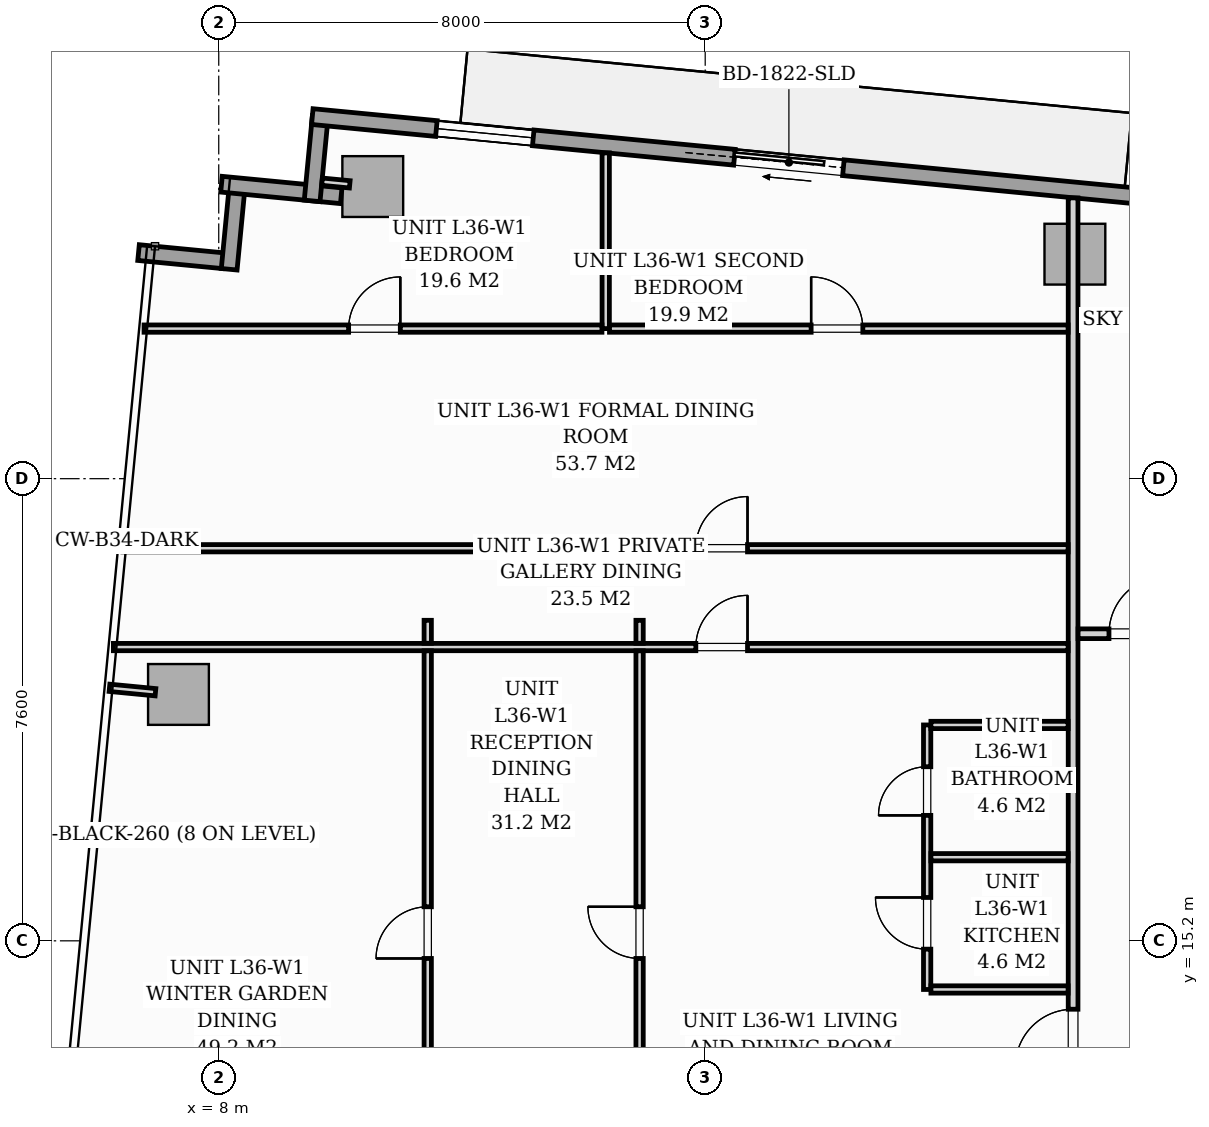
"""IFC4 building model, lengths in metres.
Left out: names, types, materials, properties, quantities, classifications, styles, units other than length and angle.
Written with IfcOpenShell. Run it as: python <this file> out.ifc"""

import sys

from ifc_helpers import new_model, si_unit, direction, frame, frame_2d, origin, origin_2d, place, context, subcontext, project, spatial, rectangle, extrude, source, transform, mapped, element, fill, save


model = new_model("IFC4")
c1 = context("Model", 3, precision=1e-05, world=origin(), true_north=direction((0.0, 1.0)))
c2 = subcontext(c1, "Body", "Model", "MODEL_VIEW")
j1 = project(units=[si_unit("LENGTHUNIT", "METRE"), si_unit("PLANEANGLEUNIT", "RADIAN")], contexts=[c1])
p1 = place(None, origin())
s1 = spatial("IfcSite", under=j1, at=p1, CompositionType="ELEMENT")
p2 = place(p1, origin())
s2 = spatial("IfcBuilding", under=s1, at=p2, CompositionType="ELEMENT")
p3 = place(p2, frame((0.0, 0.0, 127.8)))
s3 = spatial("IfcBuildingStorey", under=s2, at=p3, CompositionType="ELEMENT", Elevation=127.8)
m1 = source(origin(), c2, "Body", "SweptSolid", [
    extrude(rectangle(XDim=1.0, YDim=1.0, at=origin_2d()), origin(), (0.0, 0.0, 1.0), 3.196),
])
for number, where, z_axis, x_axis in (
    (1, (10.533, 27.604, 0.002), (0.0, 0.0, 1.0), (0.995, -0.096, 0.0)),
    (2, (22.08, 26.492, 0.002), (0.0, 0.0, 1.0), (0.995, -0.096, 0.0)),
    (3, (7.338, 19.252, 0.002), (0.0, 0.0, 1.0), (0.995, -0.096, 0.0)),
):
    element("IfcColumn", number, at=place(p3, frame(where, z_axis=z_axis, x_axis=x_axis)), inside=s3, PredefinedType="COLUMN", context=c2, shape_type="MappedRepresentation", body=[
        mapped(m1, transform((0.0, 0.0, 0.0), scale=1.0)),
    ])
p4 = place(p3, frame((6.681, 26.518, 0.0), z_axis=(0.0, 0.0, 1.0), x_axis=(0.995389446633, -0.095915846097, 0.0)))
e4 = element("IfcWall", 4, at=p4, inside=s3, PredefinedType="STANDARD", context=c2, shape_type="SweptSolid", body=[
    extrude(rectangle(XDim=1.395, YDim=0.26, at=frame_2d((0.697, 0.0))), origin(), (0.0, 0.0, 1.0), 2.94),
])
p5 = place(p3, frame((8.172, 26.244, 0.0), z_axis=(0.0, 0.0, 1.0), x_axis=(0.095725744959, 0.99540774648, 0.0)))
e5 = element("IfcWall", 5, at=p5, inside=s3, PredefinedType="STANDARD", context=c2, shape_type="SweptSolid", body=[
    extrude(rectangle(XDim=1.395, YDim=0.26, at=frame_2d((0.698, 0.0))), origin(), (0.0, 0.0, 1.0), 2.94),
])
p6 = place(p3, frame((8.045, 27.643, 0.0), z_axis=(0.0, 0.0, 1.0), x_axis=(0.995391147587, -0.095898192396, 0.0)))
e6 = element("IfcWall", 6, at=p6, inside=s3, PredefinedType="STANDARD", context=c2, shape_type="SweptSolid", body=[
    extrude(rectangle(XDim=1.978, YDim=0.26, at=frame_2d((0.989, 0.0))), origin(), (0.0, 0.0, 1.0), 2.94),
])
p7 = place(p3, frame((9.536, 27.368, 0.0), z_axis=(0.0, 0.0, 1.0), x_axis=(0.095915846097, 0.995389446633, 0.0)))
e7 = element("IfcWall", 7, at=p7, inside=s3, PredefinedType="STANDARD", context=c2, shape_type="SweptSolid", body=[
    extrude(rectangle(XDim=1.395, YDim=0.26, at=frame_2d((0.697, 0.0))), origin(), (0.0, 0.0, 1.0), 2.94),
])
p8 = place(p3, frame((9.539, 28.754, 0.0), z_axis=(0.0, 0.0, 1.0), x_axis=(0.995397345886, -0.09583383433, 0.0)))
e8 = element("IfcWall", 8, at=p8, inside=s3, PredefinedType="STANDARD", context=c2, shape_type="SweptSolid", body=[
    extrude(rectangle(XDim=17.01, YDim=0.26, at=frame_2d((8.505, 0.0))), origin(), (0.0, 0.0, 1.0), 2.94),
])
p9 = place(p8, frame((6.974, 0.0, 0.0)))
e9 = element("IfcOpeningElement", 9, at=p9, cuts=e8, PredefinedType="OPENING", context=c2, shape_type="SweptSolid", body=[
    extrude(rectangle(XDim=1.8, YDim=2.06, at=frame_2d((0.9, 1.03))), frame((0.0, 0.14, 0.0), z_axis=(0.0, -1.0, 0.0), x_axis=(1.0, 0.0, 0.0)), (0.0, 0.0, 1.0), 0.28),
])
p10 = place(p8, frame((2.05, 0.0, 0.65)))
e10 = element("IfcOpeningElement", 10, at=p10, cuts=e8, PredefinedType="OPENING", context=c2, shape_type="SweptSolid", body=[
    extrude(rectangle(XDim=1.6, YDim=1.5, at=frame_2d((0.8, 0.75))), frame((0.0, 0.14, 0.0), z_axis=(0.0, -1.0, 0.0), x_axis=(1.0, 0.0, 0.0)), (0.0, 0.0, 1.0), 0.28),
])
p11 = place(p3, frame((22.05, 12.632, 0.0), z_axis=(0.0, 0.0, 1.0), x_axis=(0.0, 1.0, 0.0)))
e11 = element("IfcWall", 11, at=p11, inside=s3, PredefinedType="PARTITIONING", context=c2, shape_type="SweptSolid", body=[
    extrude(rectangle(XDim=14.785, YDim=0.16, at=frame_2d((7.393, 0.0))), origin(), (0.0, 0.0, 1.0), 2.94),
])
p12 = place(p11, frame((0.493, 0.0, 0.0)))
e12 = element("IfcOpeningElement", 12, at=p12, cuts=e11, PredefinedType="OPENING", context=c2, shape_type="SweptSolid", body=[
    extrude(rectangle(XDim=0.95, YDim=2.06, at=frame_2d((0.475, 1.03))), frame((0.0, 0.09, 0.0), z_axis=(0.0, -1.0, 0.0), x_axis=(1.0, 0.0, 0.0)), (0.0, 0.0, 1.0), 0.18),
])
p13 = place(p3, frame((19.65, 14.4, 0.0), z_axis=(0.0, 0.0, 1.0), x_axis=(0.0, 1.0, 0.0)))
e13 = element("IfcWall", 13, at=p13, inside=s3, PredefinedType="PARTITIONING", context=c2, shape_type="SweptSolid", body=[
    extrude(rectangle(XDim=4.35, YDim=0.12, at=frame_2d((2.175, 0.0))), origin(), (0.0, 0.0, 1.0), 2.94),
])
p14 = place(p13, frame((0.663, 0.0, 0.0)))
e14 = element("IfcOpeningElement", 14, at=p14, cuts=e13, PredefinedType="OPENING", context=c2, shape_type="SweptSolid", body=[
    extrude(rectangle(XDim=0.85, YDim=2.05, at=frame_2d((0.425, 1.025))), frame((0.0, 0.07, 0.0), z_axis=(0.0, -1.0, 0.0), x_axis=(1.0, 0.0, 0.0)), (0.0, 0.0, 1.0), 0.14),
])
p15 = place(p13, frame((2.863, 0.0, 0.0)))
e15 = element("IfcOpeningElement", 15, at=p15, cuts=e13, PredefinedType="OPENING", context=c2, shape_type="SweptSolid", body=[
    extrude(rectangle(XDim=0.8, YDim=2.02, at=frame_2d((0.4, 1.01))), frame((0.0, 0.07, 0.0), z_axis=(0.0, -1.0, 0.0), x_axis=(1.0, 0.0, 0.0)), (0.0, 0.0, 1.0), 0.14),
])
for number, where, z_axis, x_axis in (
    (16, (19.712, 16.575, 0.0), (0.0, 0.0, 1.0), (1.0, 0.0, 0.0)),
    (17, (19.712, 14.4, 0.0), (0.0, 0.0, 1.0), (1.0, 0.0, 0.0)),
    (18, (19.712, 18.75, 0.0), (0.0, 0.0, 1.0), (1.0, 0.0, 0.0)),
):
    element("IfcWall", number, at=place(p3, frame(where, z_axis=z_axis, x_axis=x_axis)), inside=s3, PredefinedType="PARTITIONING", context=c2, shape_type="SweptSolid", body=[
        extrude(rectangle(XDim=2.256, YDim=0.12, at=frame_2d((1.128, 0.0))), origin(), (0.0, 0.0, 1.0), 2.94),
    ])
p16 = place(p3, frame((14.364, 25.268, 0.0), z_axis=(0.0, 0.0, 1.0), x_axis=(0.0, 1.0, 0.0)))
e19 = element("IfcWall", 19, at=p16, inside=s3, PredefinedType="PARTITIONING", context=c2, shape_type="SweptSolid", body=[
    extrude(rectangle(XDim=2.889, YDim=0.12, at=frame_2d((1.445, 0.0))), origin(), (0.0, 0.0, 1.0), 2.94),
])
p17 = place(p3, frame((6.772, 25.268, 0.0), z_axis=(0.0, 0.0, 1.0), x_axis=(1.0, 0.0, 0.0)))
e20 = element("IfcWall", 20, at=p17, inside=s3, PredefinedType="PARTITIONING", context=c2, shape_type="SweptSolid", body=[
    extrude(rectangle(XDim=7.53, YDim=0.12, at=frame_2d((3.765, 0.0))), origin(), (0.0, 0.0, 1.0), 2.94),
])
p18 = place(p17, frame((3.364, 0.0, 0.0)))
e21 = element("IfcOpeningElement", 21, at=p18, cuts=e20, PredefinedType="OPENING", context=c2, shape_type="SweptSolid", body=[
    extrude(rectangle(XDim=0.85, YDim=2.05, at=frame_2d((0.425, 1.025))), frame((0.0, 0.07, 0.0), z_axis=(0.0, -1.0, 0.0), x_axis=(1.0, 0.0, 0.0)), (0.0, 0.0, 1.0), 0.14),
])
p19 = place(p3, frame((14.426, 25.268, 0.0), z_axis=(0.0, 0.0, 1.0), x_axis=(1.0, 0.0, 0.0)))
e22 = element("IfcWall", 22, at=p19, inside=s3, PredefinedType="PARTITIONING", context=c2, shape_type="SweptSolid", body=[
    extrude(rectangle(XDim=7.542, YDim=0.12, at=frame_2d((3.771, 0.0))), origin(), (0.0, 0.0, 1.0), 2.94),
])
p20 = place(p19, frame((3.316, 0.0, 0.0)))
e23 = element("IfcOpeningElement", 23, at=p20, cuts=e22, PredefinedType="OPENING", context=c2, shape_type="SweptSolid", body=[
    extrude(rectangle(XDim=0.85, YDim=2.05, at=frame_2d((0.425, 1.025))), frame((0.0, 0.07, 0.0), z_axis=(0.0, -1.0, 0.0), x_axis=(1.0, 0.0, 0.0)), (0.0, 0.0, 1.0), 0.14),
])
p21 = place(p3, frame((6.424, 21.656, 0.0), z_axis=(0.0, 0.0, 1.0), x_axis=(1.0, 0.0, 0.0)))
e24 = element("IfcWall", 24, at=p21, inside=s3, PredefinedType="PARTITIONING", context=c2, shape_type="SweptSolid", body=[
    extrude(rectangle(XDim=15.544, YDim=0.12, at=frame_2d((7.772, 0.0))), origin(), (0.0, 0.0, 1.0), 2.94),
])
p22 = place(p21, frame((9.422, 0.0, 0.0)))
e25 = element("IfcOpeningElement", 25, at=p22, cuts=e24, PredefinedType="OPENING", context=c2, shape_type="SweptSolid", body=[
    extrude(rectangle(XDim=0.85, YDim=2.05, at=frame_2d((0.425, 1.025))), frame((0.0, 0.07, 0.0), z_axis=(0.0, -1.0, 0.0), x_axis=(1.0, 0.0, 0.0)), (0.0, 0.0, 1.0), 0.14),
])
p23 = place(p3, frame((6.268, 20.031, 0.0), z_axis=(0.0, 0.0, 1.0), x_axis=(1.0, 0.0, 0.0)))
e26 = element("IfcWall", 26, at=p23, inside=s3, PredefinedType="PARTITIONING", context=c2, shape_type="SweptSolid", body=[
    extrude(rectangle(XDim=15.7, YDim=0.12, at=frame_2d((7.85, 0.0))), origin(), (0.0, 0.0, 1.0), 2.94),
])
p24 = place(p23, frame((9.579, 0.0, 0.0)))
e27 = element("IfcOpeningElement", 27, at=p24, cuts=e26, PredefinedType="OPENING", context=c2, shape_type="SweptSolid", body=[
    extrude(rectangle(XDim=0.85, YDim=2.05, at=frame_2d((0.425, 1.025))), frame((0.0, 0.07, 0.0), z_axis=(0.0, -1.0, 0.0), x_axis=(1.0, 0.0, 0.0)), (0.0, 0.0, 1.0), 0.14),
])
p25 = place(p3, frame((11.437, 10.701, 0.0), z_axis=(0.0, 0.0, 1.0), x_axis=(0.0, 1.0, 0.0)))
e28 = element("IfcWall", 28, at=p25, inside=s3, PredefinedType="PARTITIONING", context=c2, shape_type="SweptSolid", body=[
    extrude(rectangle(XDim=9.268, YDim=0.12, at=frame_2d((4.634, 0.0))), origin(), (0.0, 0.0, 1.0), 2.94),
])
p26 = place(p25, frame((4.209, 0.0, 0.0)))
e29 = element("IfcOpeningElement", 29, at=p26, cuts=e28, PredefinedType="OPENING", context=c2, shape_type="SweptSolid", body=[
    extrude(rectangle(XDim=0.85, YDim=2.05, at=frame_2d((0.425, 1.025))), frame((0.0, 0.07, 0.0), z_axis=(0.0, -1.0, 0.0), x_axis=(1.0, 0.0, 0.0)), (0.0, 0.0, 1.0), 0.14),
])
p27 = place(p3, frame((11.437, 20.093, 0.0), z_axis=(0.0, 0.0, 1.0), x_axis=(0.0, 1.0, 0.0)))
e30 = element("IfcWall", 30, at=p27, inside=s3, PredefinedType="PARTITIONING", context=c2, shape_type="SweptSolid", body=[
    extrude(rectangle(XDim=0.378, YDim=0.12, at=frame_2d((0.189, 0.0))), origin(), (0.0, 0.0, 1.0), 2.94),
])
p28 = place(p3, frame((14.921, 10.701, 0.0), z_axis=(0.0, 0.0, 1.0), x_axis=(0.0, 1.0, 0.0)))
e31 = element("IfcWall", 31, at=p28, inside=s3, PredefinedType="PARTITIONING", context=c2, shape_type="SweptSolid", body=[
    extrude(rectangle(XDim=9.268, YDim=0.12, at=frame_2d((4.634, 0.0))), origin(), (0.0, 0.0, 1.0), 2.94),
])
p29 = place(p28, frame((4.209, 0.0, 0.0)))
e32 = element("IfcOpeningElement", 32, at=p29, cuts=e31, PredefinedType="OPENING", context=c2, shape_type="SweptSolid", body=[
    extrude(rectangle(XDim=0.85, YDim=2.05, at=frame_2d((0.425, 1.025))), frame((0.0, 0.07, 0.0), z_axis=(0.0, -1.0, 0.0), x_axis=(1.0, 0.0, 0.0)), (0.0, 0.0, 1.0), 0.14),
])
p30 = place(p3, frame((14.921, 20.093, 0.0), z_axis=(0.0, 0.0, 1.0), x_axis=(0.0, 1.0, 0.0)))
e33 = element("IfcWall", 33, at=p30, inside=s3, PredefinedType="PARTITIONING", context=c2, shape_type="SweptSolid", body=[
    extrude(rectangle(XDim=0.378, YDim=0.12, at=frame_2d((0.189, 0.0))), origin(), (0.0, 0.0, 1.0), 2.94),
])
p31 = place(p3, frame((22.132, 20.25, 0.0), z_axis=(0.0, 0.0, 1.0), x_axis=(1.0, 0.0, 0.0)))
e34 = element("IfcWall", 34, at=p31, inside=s3, PredefinedType="PARTITIONING", context=c2, shape_type="SweptSolid", body=[
    extrude(rectangle(XDim=1.886, YDim=0.16, at=frame_2d((0.943, 0.0))), origin(), (0.0, 0.0, 1.0), 2.94),
])
p32 = place(p31, frame((0.508, 0.0, 0.0)))
e35 = element("IfcOpeningElement", 35, at=p32, cuts=e34, PredefinedType="OPENING", context=c2, shape_type="SweptSolid", body=[
    extrude(rectangle(XDim=0.95, YDim=2.06, at=frame_2d((0.475, 1.03))), frame((0.0, 0.09, 0.0), z_axis=(0.0, -1.0, 0.0), x_axis=(1.0, 0.0, 0.0)), (0.0, 0.0, 1.0), 0.18),
])
p33 = place(p3, frame((10.155, 27.64, 0.0), z_axis=(0.0, 0.0, 1.0), x_axis=(-0.995435366701, 0.095438098896, 0.0)))
e36 = element("IfcWall", 36, at=p33, inside=s3, PredefinedType="PARTITIONING", context=c2, shape_type="SweptSolid", body=[
    extrude(rectangle(XDim=0.458, YDim=0.12, at=frame_2d((0.229, 0.0))), origin(), (0.0, 0.0, 1.0), 2.94),
])
p34 = place(p3, frame((6.959, 19.288, 0.0), z_axis=(0.0, 0.0, 1.0), x_axis=(-0.995377786728, 0.096036772582, 0.0)))
e37 = element("IfcWall", 37, at=p34, inside=s3, PredefinedType="PARTITIONING", context=c2, shape_type="SweptSolid", body=[
    extrude(rectangle(XDim=0.76, YDim=0.12, at=frame_2d((0.38, 0.0))), origin(), (0.0, 0.0, 1.0), 2.94),
])
m2 = source(origin(), c2, "Body", "SweptSolid", [
    extrude(rectangle(XDim=1.8, YDim=2.06, at=frame_2d((0.9, 1.03))), frame((0.0, 0.025, 0.0), z_axis=(0.0, -1.0, 0.0), x_axis=(1.0, 0.0, 0.0)), (0.0, 0.0, 1.0), 0.05),
])
p35 = place(p9, origin())
e38 = element("IfcDoor", 38, at=p35, inside=s3, OperationType="SLIDING_TO_LEFT", PredefinedType="DOOR", context=c2, shape_type="MappedRepresentation", body=[
    mapped(m2, transform((0.0, 0.0, 0.0), scale=1.0)),
])
fill(e9, e38)
m3 = source(origin(), c2, "Body", "SweptSolid", [
    extrude(rectangle(XDim=1.6, YDim=1.5, at=frame_2d((0.8, 0.75))), frame((0.0, 0.03, 0.0), z_axis=(0.0, -1.0, 0.0), x_axis=(1.0, 0.0, 0.0)), (0.0, 0.0, 1.0), 0.06),
])
p36 = place(p10, origin())
e39 = element("IfcWindow", 39, at=p36, inside=s3, PartitioningType="SINGLE_PANEL", PredefinedType="WINDOW", context=c2, shape_type="MappedRepresentation", body=[
    mapped(m3, transform((0.0, 0.0, 0.0), scale=1.0)),
])
fill(e10, e39)
m4 = source(origin(), c2, "Body", "SweptSolid", [
    extrude(rectangle(XDim=0.95, YDim=2.06, at=frame_2d((0.475, 1.03))), frame((0.0, 0.025, 0.0), z_axis=(0.0, -1.0, 0.0), x_axis=(1.0, 0.0, 0.0)), (0.0, 0.0, 1.0), 0.05),
])
p37 = place(p12, origin())
e40 = element("IfcDoor", 40, at=p37, inside=s3, OperationType="SINGLE_SWING_LEFT", PredefinedType="DOOR", context=c2, shape_type="MappedRepresentation", body=[
    mapped(m4, transform((0.0, 0.0, 0.0), scale=1.0)),
])
fill(e12, e40)
m5 = source(origin(), c2, "Body", "SweptSolid", [
    extrude(rectangle(XDim=0.85, YDim=2.05, at=frame_2d((0.425, 1.025))), frame((0.0, 0.025, 0.0), z_axis=(0.0, -1.0, 0.0), x_axis=(1.0, 0.0, 0.0)), (0.0, 0.0, 1.0), 0.05),
])
p38 = place(p14, origin())
e41 = element("IfcDoor", 41, at=p38, inside=s3, OperationType="SINGLE_SWING_RIGHT", PredefinedType="DOOR", context=c2, shape_type="MappedRepresentation", body=[
    mapped(m5, transform((0.0, 0.0, 0.0), scale=1.0)),
])
fill(e14, e41)
m6 = source(origin(), c2, "Body", "SweptSolid", [
    extrude(rectangle(XDim=0.8, YDim=2.02, at=frame_2d((0.4, 1.01))), frame((0.0, 0.025, 0.0), z_axis=(0.0, -1.0, 0.0), x_axis=(1.0, 0.0, 0.0)), (0.0, 0.0, 1.0), 0.05),
])
p39 = place(p15, origin())
e42 = element("IfcDoor", 42, at=p39, inside=s3, OperationType="SINGLE_SWING_LEFT", PredefinedType="DOOR", context=c2, shape_type="MappedRepresentation", body=[
    mapped(m6, transform((0.0, 0.0, 0.0), scale=1.0)),
])
fill(e15, e42)
p40 = place(p18, origin())
e43 = element("IfcDoor", 43, at=p40, inside=s3, OperationType="SINGLE_SWING_RIGHT", PredefinedType="DOOR", context=c2, shape_type="MappedRepresentation", body=[
    mapped(m5, transform((0.0, 0.0, 0.0), scale=1.0)),
])
fill(e21, e43)
p41 = place(p20, origin())
e44 = element("IfcDoor", 44, at=p41, inside=s3, OperationType="SINGLE_SWING_LEFT", PredefinedType="DOOR", context=c2, shape_type="MappedRepresentation", body=[
    mapped(m5, transform((0.0, 0.0, 0.0), scale=1.0)),
])
fill(e23, e44)
p42 = place(p22, origin())
e45 = element("IfcDoor", 45, at=p42, inside=s3, OperationType="SINGLE_SWING_RIGHT", PredefinedType="DOOR", context=c2, shape_type="MappedRepresentation", body=[
    mapped(m5, transform((0.0, 0.0, 0.0), scale=1.0)),
])
fill(e25, e45)
p43 = place(p24, origin())
e46 = element("IfcDoor", 46, at=p43, inside=s3, OperationType="SINGLE_SWING_RIGHT", PredefinedType="DOOR", context=c2, shape_type="MappedRepresentation", body=[
    mapped(m5, transform((0.0, 0.0, 0.0), scale=1.0)),
])
fill(e27, e46)
p44 = place(p26, origin())
e47 = element("IfcDoor", 47, at=p44, inside=s3, OperationType="SINGLE_SWING_LEFT", PredefinedType="DOOR", context=c2, shape_type="MappedRepresentation", body=[
    mapped(m5, transform((0.0, 0.0, 0.0), scale=1.0)),
])
fill(e29, e47)
p45 = place(p29, origin())
e48 = element("IfcDoor", 48, at=p45, inside=s3, OperationType="SINGLE_SWING_RIGHT", PredefinedType="DOOR", context=c2, shape_type="MappedRepresentation", body=[
    mapped(m5, transform((0.0, 0.0, 0.0), scale=1.0)),
])
fill(e32, e48)
p46 = place(p32, origin())
e49 = element("IfcDoor", 49, at=p46, inside=s3, OperationType="SINGLE_SWING_RIGHT", PredefinedType="DOOR", context=c2, shape_type="MappedRepresentation", body=[
    mapped(m4, transform((0.0, 0.0, 0.0), scale=1.0)),
])
fill(e35, e49)
save(model, sys.argv[1])
